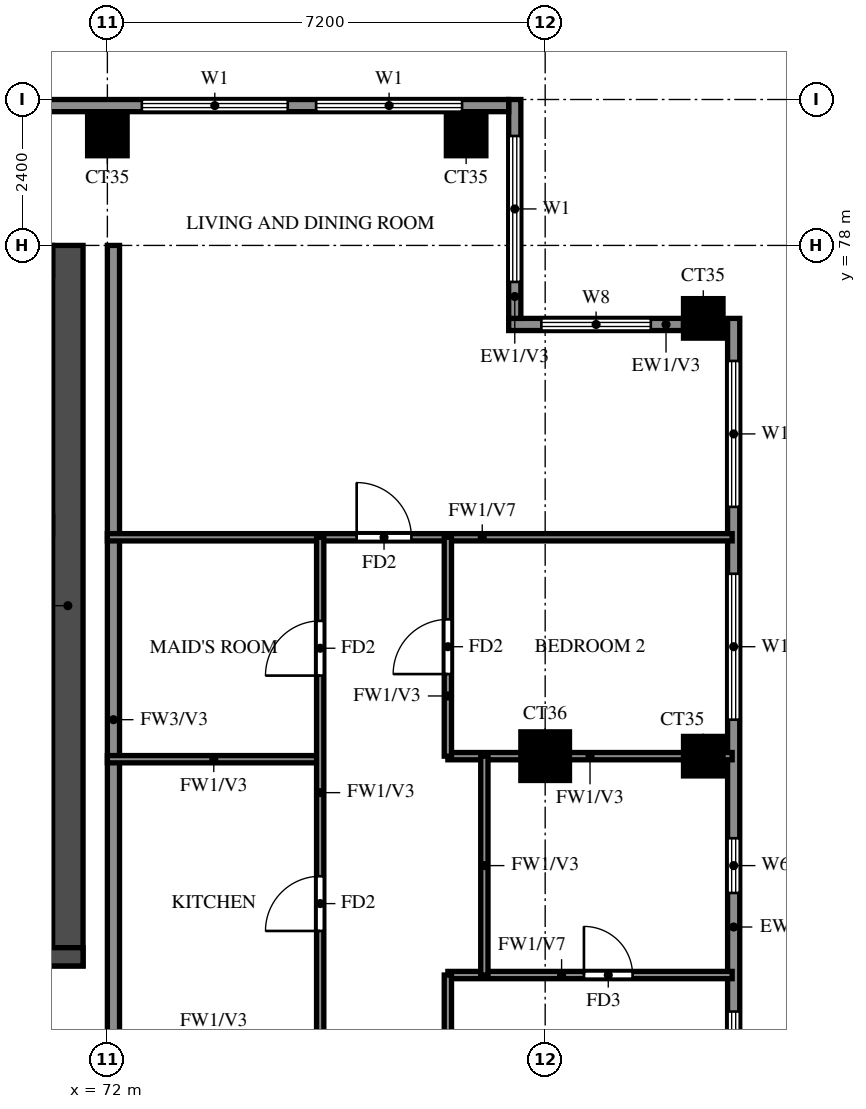
"""IFC4 building model, lengths in metres.
Left out: names, types, materials, properties, quantities, classifications, styles, units other than length and angle.
Written with IfcOpenShell. Run it as: python <this file> out.ifc"""

import sys

from ifc_helpers import new_model, si_unit, direction, frame, frame_2d, origin, origin_2d, place, context, subcontext, project, spatial, rectangle, extrude, source, transform, mapped, element, fill, save


model = new_model("IFC4")
c1 = context("Model", 3, precision=1e-05, world=origin(), true_north=direction((0.0, 1.0)))
c2 = subcontext(c1, "Body", "Model", "MODEL_VIEW")
j1 = project(units=[si_unit("LENGTHUNIT", "METRE"), si_unit("PLANEANGLEUNIT", "RADIAN")], contexts=[c1])
p1 = place(None, origin())
s1 = spatial("IfcSite", under=j1, at=p1, CompositionType="ELEMENT")
p2 = place(p1, origin())
s2 = spatial("IfcBuilding", under=s1, at=p2, CompositionType="ELEMENT")
p3 = place(p2, frame((0.0, 0.0, 232.5)))
s3 = spatial("IfcBuildingStorey", under=s2, at=p3, CompositionType="ELEMENT", Elevation=232.5)
m1 = source(origin(), c2, "Body", "SweptSolid", [
    extrude(rectangle(XDim=0.8, YDim=0.8, at=origin_2d()), origin(), (0.0, 0.0, 1.0), 3.22),
])
p4 = place(p3, frame((79.2, 69.6, 0.0), z_axis=(0.0, 0.0, 1.0), x_axis=(1.0, 0.0, 0.0)))
e1 = element("IfcColumn", 1, at=p4, inside=s3, PredefinedType="COLUMN", context=c2, shape_type="MappedRepresentation", body=[
    mapped(m1, transform((0.0, 0.0, 0.0))),
])
m2 = source(origin(), c2, "Body", "SweptSolid", [
    extrude(rectangle(XDim=0.65, YDim=0.65, at=origin_2d()), origin(), (0.0, 0.0, 1.0), 3.22),
])
for number, where, z_axis, x_axis in (
    (2, (81.8, 69.6, 0.0), (0.0, 0.0, 1.0), (1.0, 0.0, 0.0)),
    (3, (81.8, 76.8, 0.0), (0.0, 0.0, 1.0), (1.0, 0.0, 0.0)),
    (4, (72.0, 79.8, 0.0), (0.0, 0.0, 1.0), (1.0, 0.0, 0.0)),
    (5, (77.9, 79.8, 0.0), (0.0, 0.0, 1.0), (1.0, 0.0, 0.0)),
):
    element("IfcColumn", number, at=place(p3, frame(where, z_axis=z_axis, x_axis=x_axis)), inside=s3, PredefinedType="COLUMN", context=c2, shape_type="MappedRepresentation", body=[
        mapped(m2, transform((0.0, 0.0, 0.0))),
    ])
p5 = place(p3, frame((71.35, 66.15, 0.0), z_axis=(0.0, 0.0, 1.0), x_axis=(0.0, 1.0, 0.0)))
e6 = element("IfcWall", 6, at=p5, inside=s3, PredefinedType="SHEAR", context=c2, shape_type="SweptSolid", body=[
    extrude(rectangle(XDim=11.85, YDim=0.5, at=frame_2d((5.925, 0.0))), origin(), (0.0, 0.0, 1.0), 3.22),
])
p6 = place(p3, frame((29.7, 77.75, 0.0), z_axis=(0.0, 0.0, 1.0), x_axis=(1.0, 0.0, 0.0)))
e7 = element("IfcWall", 7, at=p6, inside=s3, PredefinedType="SHEAR", context=c2, shape_type="SweptSolid", body=[
    extrude(rectangle(XDim=41.4, YDim=0.5, at=frame_2d((20.7, 0.0))), origin(), (0.0, 0.0, 1.0), 3.22),
])
p7 = place(p3, frame((29.2, 66.3, 0.0), z_axis=(0.0, 0.0, 1.0), x_axis=(1.0, 0.0, 0.0)))
e8 = element("IfcWall", 8, at=p7, inside=s3, PredefinedType="SHEAR", context=c2, shape_type="SweptSolid", body=[
    extrude(rectangle(XDim=42.4, YDim=0.3, at=frame_2d((21.2, 0.0))), origin(), (0.0, 0.0, 1.0), 3.22),
])
p8 = place(p7, frame((1.425, 0.0, 0.0)))
e9 = element("IfcOpeningElement", 9, at=p8, cuts=e8, PredefinedType="OPENING", context=c2, shape_type="SweptSolid", body=[
    extrude(rectangle(XDim=1.1, YDim=2.1, at=frame_2d((0.55, 1.05))), frame((0.0, 0.16, 0.0), z_axis=(0.0, -1.0, 0.0), x_axis=(1.0, 0.0, 0.0)), (0.0, 0.0, 1.0), 0.32),
])
p9 = place(p7, frame((4.2, 0.0, 0.0)))
e10 = element("IfcOpeningElement", 10, at=p9, cuts=e8, PredefinedType="OPENING", context=c2, shape_type="SweptSolid", body=[
    extrude(rectangle(XDim=1.8, YDim=2.1, at=frame_2d((0.9, 1.05))), frame((0.0, 0.16, 0.0), z_axis=(0.0, -1.0, 0.0), x_axis=(1.0, 0.0, 0.0)), (0.0, 0.0, 1.0), 0.32),
])
p10 = place(p3, frame((82.3, 48.2, 0.0), z_axis=(0.0, 0.0, 1.0), x_axis=(0.0, 1.0, 0.0)))
e11 = element("IfcWall", 11, at=p10, inside=s3, PredefinedType="SOLIDWALL", context=c2, shape_type="SweptSolid", body=[
    extrude(rectangle(XDim=28.6, YDim=0.2, at=frame_2d((14.3, 0.0))), origin(), (0.0, 0.0, 1.0), 3.22),
])
p11 = place(p10, frame((4.3, 0.0, 0.0)))
e12 = element("IfcOpeningElement", 12, at=p11, cuts=e11, PredefinedType="OPENING", context=c2, shape_type="SweptSolid", body=[
    extrude(rectangle(XDim=1.8, YDim=2.4, at=frame_2d((0.9, 1.2))), frame((0.0, 0.11, 0.0), z_axis=(0.0, -1.0, 0.0), x_axis=(1.0, 0.0, 0.0)), (0.0, 0.0, 1.0), 0.22),
])
p12 = place(p10, frame((0.6, 0.0, 0.6)))
e13 = element("IfcOpeningElement", 13, at=p12, cuts=e11, PredefinedType="OPENING", context=c2, shape_type="SweptSolid", body=[
    extrude(rectangle(XDim=1.2, YDim=2.4, at=frame_2d((0.6, 1.2))), frame((0.0, 0.11, 0.0), z_axis=(0.0, -1.0, 0.0), x_axis=(1.0, 0.0, 0.0)), (0.0, 0.0, 1.0), 0.22),
])
p13 = place(p10, frame((2.95, 0.0, 0.6)))
e14 = element("IfcOpeningElement", 14, at=p13, cuts=e11, PredefinedType="OPENING", context=c2, shape_type="SweptSolid", body=[
    extrude(rectangle(XDim=0.9, YDim=2.4, at=frame_2d((0.45, 1.2))), frame((0.0, 0.11, 0.0), z_axis=(0.0, -1.0, 0.0), x_axis=(1.0, 0.0, 0.0)), (0.0, 0.0, 1.0), 0.22),
])
p14 = place(p10, frame((11.2, 0.0, 0.6)))
e15 = element("IfcOpeningElement", 15, at=p14, cuts=e11, PredefinedType="OPENING", context=c2, shape_type="SweptSolid", body=[
    extrude(rectangle(XDim=2.4, YDim=2.4, at=frame_2d((1.2, 1.2))), frame((0.0, 0.11, 0.0), z_axis=(0.0, -1.0, 0.0), x_axis=(1.0, 0.0, 0.0)), (0.0, 0.0, 1.0), 0.22),
])
p15 = place(p10, frame((7.45, 0.0, 1.5)))
e16 = element("IfcOpeningElement", 16, at=p15, cuts=e11, PredefinedType="OPENING", context=c2, shape_type="SweptSolid", body=[
    extrude(rectangle(XDim=0.9, YDim=0.9, at=frame_2d((0.45, 0.45))), frame((0.0, 0.11, 0.0), z_axis=(0.0, -1.0, 0.0), x_axis=(1.0, 0.0, 0.0)), (0.0, 0.0, 1.0), 0.22),
])
p16 = place(p10, frame((9.55, 0.0, 1.5)))
e17 = element("IfcOpeningElement", 17, at=p16, cuts=e11, PredefinedType="OPENING", context=c2, shape_type="SweptSolid", body=[
    extrude(rectangle(XDim=0.9, YDim=0.9, at=frame_2d((0.45, 0.45))), frame((0.0, 0.11, 0.0), z_axis=(0.0, -1.0, 0.0), x_axis=(1.0, 0.0, 0.0)), (0.0, 0.0, 1.0), 0.22),
])
p17 = place(p10, frame((14.8, 0.0, 0.6)))
e18 = element("IfcOpeningElement", 18, at=p17, cuts=e11, PredefinedType="OPENING", context=c2, shape_type="SweptSolid", body=[
    extrude(rectangle(XDim=2.4, YDim=2.4, at=frame_2d((1.2, 1.2))), frame((0.0, 0.11, 0.0), z_axis=(0.0, -1.0, 0.0), x_axis=(1.0, 0.0, 0.0)), (0.0, 0.0, 1.0), 0.22),
])
p18 = place(p10, frame((19.15, 0.0, 1.5)))
e19 = element("IfcOpeningElement", 19, at=p18, cuts=e11, PredefinedType="OPENING", context=c2, shape_type="SweptSolid", body=[
    extrude(rectangle(XDim=0.9, YDim=0.9, at=frame_2d((0.45, 0.45))), frame((0.0, 0.11, 0.0), z_axis=(0.0, -1.0, 0.0), x_axis=(1.0, 0.0, 0.0)), (0.0, 0.0, 1.0), 0.22),
])
p19 = place(p10, frame((22.0, 0.0, 0.6)))
e20 = element("IfcOpeningElement", 20, at=p19, cuts=e11, PredefinedType="OPENING", context=c2, shape_type="SweptSolid", body=[
    extrude(rectangle(XDim=2.4, YDim=2.4, at=frame_2d((1.2, 1.2))), frame((0.0, 0.11, 0.0), z_axis=(0.0, -1.0, 0.0), x_axis=(1.0, 0.0, 0.0)), (0.0, 0.0, 1.0), 0.22),
])
p20 = place(p10, frame((25.5, 0.0, 0.6)))
e21 = element("IfcOpeningElement", 21, at=p20, cuts=e11, PredefinedType="OPENING", context=c2, shape_type="SweptSolid", body=[
    extrude(rectangle(XDim=2.4, YDim=2.4, at=frame_2d((1.2, 1.2))), frame((0.0, 0.11, 0.0), z_axis=(0.0, -1.0, 0.0), x_axis=(1.0, 0.0, 0.0)), (0.0, 0.0, 1.0), 0.22),
])
p21 = place(p3, frame((81.475, 76.7, 0.0), z_axis=(0.0, 0.0, 1.0), x_axis=(-1.0, 0.0, 0.0)))
e22 = element("IfcWall", 22, at=p21, inside=s3, PredefinedType="SOLIDWALL", context=c2, shape_type="SweptSolid", body=[
    extrude(rectangle(XDim=2.875, YDim=0.2, at=frame_2d((1.438, 0.0))), origin(), (0.0, 0.0, 1.0), 3.22),
])
p22 = place(p21, frame((0.538, 0.0, 0.6)))
e23 = element("IfcOpeningElement", 23, at=p22, cuts=e22, PredefinedType="OPENING", context=c2, shape_type="SweptSolid", body=[
    extrude(rectangle(XDim=1.8, YDim=2.4, at=frame_2d((0.9, 1.2))), frame((0.0, 0.11, 0.0), z_axis=(0.0, -1.0, 0.0), x_axis=(1.0, 0.0, 0.0)), (0.0, 0.0, 1.0), 0.22),
])
p23 = place(p3, frame((78.7, 76.8, 0.0), z_axis=(0.0, 0.0, 1.0), x_axis=(0.0, 1.0, 0.0)))
e24 = element("IfcWall", 24, at=p23, inside=s3, PredefinedType="SOLIDWALL", context=c2, shape_type="SweptSolid", body=[
    extrude(rectangle(XDim=3.6, YDim=0.2, at=frame_2d((1.8, 0.0))), origin(), (0.0, 0.0, 1.0), 3.22),
])
p24 = place(p23, frame((0.6, 0.0, 0.6)))
e25 = element("IfcOpeningElement", 25, at=p24, cuts=e24, PredefinedType="OPENING", context=c2, shape_type="SweptSolid", body=[
    extrude(rectangle(XDim=2.4, YDim=2.4, at=frame_2d((1.2, 1.2))), frame((0.0, 0.11, 0.0), z_axis=(0.0, -1.0, 0.0), x_axis=(1.0, 0.0, 0.0)), (0.0, 0.0, 1.0), 0.22),
])
p25 = place(p3, frame((78.6, 80.3, 0.0), z_axis=(0.0, 0.0, 1.0), x_axis=(-1.0, 0.0, 0.0)))
e26 = element("IfcWall", 26, at=p25, inside=s3, PredefinedType="SOLIDWALL", context=c2, shape_type="SweptSolid", body=[
    extrude(rectangle(XDim=56.6, YDim=0.2, at=frame_2d((28.3, 0.0))), origin(), (0.0, 0.0, 1.0), 3.22),
])
p26 = place(p25, frame((50.433, 0.0, 0.6)))
e27 = element("IfcOpeningElement", 27, at=p26, cuts=e26, PredefinedType="OPENING", context=c2, shape_type="SweptSolid", body=[
    extrude(rectangle(XDim=2.4, YDim=2.4, at=frame_2d((1.2, 1.2))), frame((0.0, 0.11, 0.0), z_axis=(0.0, -1.0, 0.0), x_axis=(1.0, 0.0, 0.0)), (0.0, 0.0, 1.0), 0.22),
])
p27 = place(p25, frame((53.367, 0.0, 0.6)))
e28 = element("IfcOpeningElement", 28, at=p27, cuts=e26, PredefinedType="OPENING", context=c2, shape_type="SweptSolid", body=[
    extrude(rectangle(XDim=2.4, YDim=2.4, at=frame_2d((1.2, 1.2))), frame((0.0, 0.11, 0.0), z_axis=(0.0, -1.0, 0.0), x_axis=(1.0, 0.0, 0.0)), (0.0, 0.0, 1.0), 0.22),
])
p28 = place(p25, frame((0.767, 0.0, 0.6)))
e29 = element("IfcOpeningElement", 29, at=p28, cuts=e26, PredefinedType="OPENING", context=c2, shape_type="SweptSolid", body=[
    extrude(rectangle(XDim=2.4, YDim=2.4, at=frame_2d((1.2, 1.2))), frame((0.0, 0.11, 0.0), z_axis=(0.0, -1.0, 0.0), x_axis=(1.0, 0.0, 0.0)), (0.0, 0.0, 1.0), 0.22),
])
p29 = place(p25, frame((3.633, 0.0, 0.6)))
e30 = element("IfcOpeningElement", 30, at=p29, cuts=e26, PredefinedType="OPENING", context=c2, shape_type="SweptSolid", body=[
    extrude(rectangle(XDim=2.4, YDim=2.4, at=frame_2d((1.2, 1.2))), frame((0.0, 0.11, 0.0), z_axis=(0.0, -1.0, 0.0), x_axis=(1.0, 0.0, 0.0)), (0.0, 0.0, 1.0), 0.22),
])
p30 = place(p3, frame((72.1, 62.4, 0.0), z_axis=(0.0, 0.0, 1.0), x_axis=(0.0, 1.0, 0.0)))
e31 = element("IfcWall", 31, at=p30, inside=s3, PredefinedType="SOLIDWALL", context=c2, shape_type="SweptSolid", body=[
    extrude(rectangle(XDim=15.6, YDim=0.2, at=frame_2d((7.8, 0.0))), origin(), (0.0, 0.0, 1.0), 3.22),
])
p31 = place(p3, frame((77.6, 66.0, 0.0), z_axis=(0.0, 0.0, 1.0), x_axis=(1.0, 0.0, 0.0)))
e32 = element("IfcWall", 32, at=p31, inside=s3, PredefinedType="PARTITIONING", context=c2, shape_type="SweptSolid", body=[
    extrude(rectangle(XDim=4.675, YDim=0.12, at=frame_2d((2.337, 0.0))), origin(), (0.0, 0.0, 1.0), 2.32),
])
p32 = place(p31, frame((2.238, 0.0, 0.0)))
e33 = element("IfcOpeningElement", 33, at=p32, cuts=e32, PredefinedType="OPENING", context=c2, shape_type="SweptSolid", body=[
    extrude(rectangle(XDim=0.8, YDim=2.1, at=frame_2d((0.4, 1.05))), frame((0.0, 0.07, 0.0), z_axis=(0.0, -1.0, 0.0), x_axis=(1.0, 0.0, 0.0)), (0.0, 0.0, 1.0), 0.14),
])
p33 = place(p3, frame((72.0, 69.55, 0.0), z_axis=(0.0, 0.0, 1.0), x_axis=(1.0, 0.0, 0.0)))
e34 = element("IfcWall", 34, at=p33, inside=s3, PredefinedType="PARTITIONING", context=c2, shape_type="SweptSolid", body=[
    extrude(rectangle(XDim=3.5, YDim=0.12, at=frame_2d((1.75, 0.0))), origin(), (0.0, 0.0, 1.0), 3.22),
])
p34 = place(p3, frame((77.6, 69.6, 0.0), z_axis=(0.0, 0.0, 1.0), x_axis=(1.0, 0.0, 0.0)))
e35 = element("IfcWall", 35, at=p34, inside=s3, PredefinedType="PARTITIONING", context=c2, shape_type="SweptSolid", body=[
    extrude(rectangle(XDim=4.675, YDim=0.12, at=frame_2d((2.337, 0.0))), origin(), (0.0, 0.0, 1.0), 3.22),
])
p35 = place(p3, frame((72.0, 73.2, 0.0), z_axis=(0.0, 0.0, 1.0), x_axis=(1.0, 0.0, 0.0)))
e36 = element("IfcWall", 36, at=p35, inside=s3, PredefinedType="PARTITIONING", context=c2, shape_type="SweptSolid", body=[
    extrude(rectangle(XDim=10.275, YDim=0.12, at=frame_2d((5.137, 0.0))), origin(), (0.0, 0.0, 1.0), 2.32),
])
p36 = place(p35, frame((4.1, 0.0, 0.0)))
e37 = element("IfcOpeningElement", 37, at=p36, cuts=e36, PredefinedType="OPENING", context=c2, shape_type="SweptSolid", body=[
    extrude(rectangle(XDim=0.9, YDim=2.1, at=frame_2d((0.45, 1.05))), frame((0.0, 0.07, 0.0), z_axis=(0.0, -1.0, 0.0), x_axis=(1.0, 0.0, 0.0)), (0.0, 0.0, 1.0), 0.14),
])
p37 = place(p3, frame((75.5, 64.8, 0.0), z_axis=(0.0, 0.0, 1.0), x_axis=(0.0, 1.0, 0.0)))
e38 = element("IfcWall", 38, at=p37, inside=s3, PredefinedType="PARTITIONING", context=c2, shape_type="SweptSolid", body=[
    extrude(rectangle(XDim=8.4, YDim=0.12, at=frame_2d((4.2, 0.0))), origin(), (0.0, 0.0, 1.0), 3.22),
])
p38 = place(p37, frame((1.925, 0.0, 0.0)))
e39 = element("IfcOpeningElement", 39, at=p38, cuts=e38, PredefinedType="OPENING", context=c2, shape_type="SweptSolid", body=[
    extrude(rectangle(XDim=0.9, YDim=2.1, at=frame_2d((0.45, 1.05))), frame((0.0, 0.07, 0.0), z_axis=(0.0, -1.0, 0.0), x_axis=(1.0, 0.0, 0.0)), (0.0, 0.0, 1.0), 0.14),
])
p39 = place(p37, frame((6.125, 0.0, 0.0)))
e40 = element("IfcOpeningElement", 40, at=p39, cuts=e38, PredefinedType="OPENING", context=c2, shape_type="SweptSolid", body=[
    extrude(rectangle(XDim=0.9, YDim=2.1, at=frame_2d((0.45, 1.05))), frame((0.0, 0.07, 0.0), z_axis=(0.0, -1.0, 0.0), x_axis=(1.0, 0.0, 0.0)), (0.0, 0.0, 1.0), 0.14),
])
p40 = place(p3, frame((77.6, 58.8, 0.0), z_axis=(0.0, 0.0, 1.0), x_axis=(0.0, 1.0, 0.0)))
e41 = element("IfcWall", 41, at=p40, inside=s3, PredefinedType="PARTITIONING", context=c2, shape_type="SweptSolid", body=[
    extrude(rectangle(XDim=7.2, YDim=0.12, at=frame_2d((3.6, 0.0))), origin(), (0.0, 0.0, 1.0), 3.22),
])
p41 = place(p40, frame((1.35, 0.0, 0.0)))
e42 = element("IfcOpeningElement", 42, at=p41, cuts=e41, PredefinedType="OPENING", context=c2, shape_type="SweptSolid", body=[
    extrude(rectangle(XDim=0.9, YDim=2.1, at=frame_2d((0.45, 1.05))), frame((0.0, 0.07, 0.0), z_axis=(0.0, -1.0, 0.0), x_axis=(1.0, 0.0, 0.0)), (0.0, 0.0, 1.0), 0.14),
])
p42 = place(p40, frame((4.95, 0.0, 0.0)))
e43 = element("IfcOpeningElement", 43, at=p42, cuts=e41, PredefinedType="OPENING", context=c2, shape_type="SweptSolid", body=[
    extrude(rectangle(XDim=0.9, YDim=2.1, at=frame_2d((0.45, 1.05))), frame((0.0, 0.07, 0.0), z_axis=(0.0, -1.0, 0.0), x_axis=(1.0, 0.0, 0.0)), (0.0, 0.0, 1.0), 0.14),
])
p43 = place(p3, frame((77.6, 69.6, 0.0), z_axis=(0.0, 0.0, 1.0), x_axis=(0.0, 1.0, 0.0)))
e44 = element("IfcWall", 44, at=p43, inside=s3, PredefinedType="PARTITIONING", context=c2, shape_type="SweptSolid", body=[
    extrude(rectangle(XDim=3.6, YDim=0.12, at=frame_2d((1.8, 0.0))), origin(), (0.0, 0.0, 1.0), 3.22),
])
p44 = place(p43, frame((1.35, 0.0, 0.0)))
e45 = element("IfcOpeningElement", 45, at=p44, cuts=e44, PredefinedType="OPENING", context=c2, shape_type="SweptSolid", body=[
    extrude(rectangle(XDim=0.9, YDim=2.1, at=frame_2d((0.45, 1.05))), frame((0.0, 0.07, 0.0), z_axis=(0.0, -1.0, 0.0), x_axis=(1.0, 0.0, 0.0)), (0.0, 0.0, 1.0), 0.14),
])
p45 = place(p3, frame((78.2, 66.0, 0.0), z_axis=(0.0, 0.0, 1.0), x_axis=(0.0, 1.0, 0.0)))
e46 = element("IfcWall", 46, at=p45, inside=s3, PredefinedType="PARTITIONING", context=c2, shape_type="SweptSolid", body=[
    extrude(rectangle(XDim=3.6, YDim=0.12, at=frame_2d((1.8, 0.0))), origin(), (0.0, 0.0, 1.0), 3.22),
])
p46 = place(p17, origin())
e47 = element("IfcWindow", 47, at=p46, inside=s3, PartitioningType="DOUBLE_PANEL_VERTICAL", PredefinedType="WINDOW", context=c2, shape_type="SweptSolid", body=[
    extrude(rectangle(XDim=2.4, YDim=2.4, at=frame_2d((1.2, 1.2))), frame((0.0, 0.03, 0.0), z_axis=(0.0, -1.0, 0.0), x_axis=(1.0, 0.0, 0.0)), (0.0, 0.0, 1.0), 0.06),
])
fill(e18, e47)
p47 = place(p18, origin())
e48 = element("IfcWindow", 48, at=p47, inside=s3, PartitioningType="SINGLE_PANEL", PredefinedType="WINDOW", context=c2, shape_type="SweptSolid", body=[
    extrude(rectangle(XDim=0.9, YDim=0.9, at=frame_2d((0.45, 0.45))), frame((0.0, 0.03, 0.0), z_axis=(0.0, -1.0, 0.0), x_axis=(1.0, 0.0, 0.0)), (0.0, 0.0, 1.0), 0.06),
])
fill(e19, e48)
p48 = place(p19, origin())
e49 = element("IfcWindow", 49, at=p48, inside=s3, PartitioningType="DOUBLE_PANEL_VERTICAL", PredefinedType="WINDOW", context=c2, shape_type="SweptSolid", body=[
    extrude(rectangle(XDim=2.4, YDim=2.4, at=frame_2d((1.2, 1.2))), frame((0.0, 0.03, 0.0), z_axis=(0.0, -1.0, 0.0), x_axis=(1.0, 0.0, 0.0)), (0.0, 0.0, 1.0), 0.06),
])
fill(e20, e49)
p49 = place(p20, origin())
e50 = element("IfcWindow", 50, at=p49, inside=s3, PartitioningType="DOUBLE_PANEL_VERTICAL", PredefinedType="WINDOW", context=c2, shape_type="SweptSolid", body=[
    extrude(rectangle(XDim=2.4, YDim=2.4, at=frame_2d((1.2, 1.2))), frame((0.0, 0.03, 0.0), z_axis=(0.0, -1.0, 0.0), x_axis=(1.0, 0.0, 0.0)), (0.0, 0.0, 1.0), 0.06),
])
fill(e21, e50)
p50 = place(p22, origin())
e51 = element("IfcWindow", 51, at=p50, inside=s3, PartitioningType="DOUBLE_PANEL_VERTICAL", PredefinedType="WINDOW", context=c2, shape_type="SweptSolid", body=[
    extrude(rectangle(XDim=1.8, YDim=2.4, at=frame_2d((0.9, 1.2))), frame((0.0, 0.03, 0.0), z_axis=(0.0, -1.0, 0.0), x_axis=(1.0, 0.0, 0.0)), (0.0, 0.0, 1.0), 0.06),
])
fill(e23, e51)
p51 = place(p24, origin())
e52 = element("IfcWindow", 52, at=p51, inside=s3, PartitioningType="DOUBLE_PANEL_VERTICAL", PredefinedType="WINDOW", context=c2, shape_type="SweptSolid", body=[
    extrude(rectangle(XDim=2.4, YDim=2.4, at=frame_2d((1.2, 1.2))), frame((0.0, 0.03, 0.0), z_axis=(0.0, -1.0, 0.0), x_axis=(1.0, 0.0, 0.0)), (0.0, 0.0, 1.0), 0.06),
])
fill(e25, e52)
p52 = place(p28, origin())
e53 = element("IfcWindow", 53, at=p52, inside=s3, PartitioningType="DOUBLE_PANEL_VERTICAL", PredefinedType="WINDOW", context=c2, shape_type="SweptSolid", body=[
    extrude(rectangle(XDim=2.4, YDim=2.4, at=frame_2d((1.2, 1.2))), frame((0.0, 0.03, 0.0), z_axis=(0.0, -1.0, 0.0), x_axis=(1.0, 0.0, 0.0)), (0.0, 0.0, 1.0), 0.06),
])
fill(e29, e53)
p53 = place(p29, origin())
e54 = element("IfcWindow", 54, at=p53, inside=s3, PartitioningType="DOUBLE_PANEL_VERTICAL", PredefinedType="WINDOW", context=c2, shape_type="SweptSolid", body=[
    extrude(rectangle(XDim=2.4, YDim=2.4, at=frame_2d((1.2, 1.2))), frame((0.0, 0.03, 0.0), z_axis=(0.0, -1.0, 0.0), x_axis=(1.0, 0.0, 0.0)), (0.0, 0.0, 1.0), 0.06),
])
fill(e30, e54)
p54 = place(p32, origin())
e55 = element("IfcDoor", 55, at=p54, inside=s3, OperationType="SINGLE_SWING_LEFT", PredefinedType="DOOR", context=c2, shape_type="SweptSolid", body=[
    extrude(rectangle(XDim=0.8, YDim=2.1, at=frame_2d((0.4, 1.05))), frame((0.0, 0.025, 0.0), z_axis=(0.0, -1.0, 0.0), x_axis=(1.0, 0.0, 0.0)), (0.0, 0.0, 1.0), 0.05),
])
fill(e33, e55)
p55 = place(p44, origin())
e56 = element("IfcDoor", 56, at=p55, inside=s3, OperationType="SINGLE_SWING_LEFT", PredefinedType="DOOR", context=c2, shape_type="SweptSolid", body=[
    extrude(rectangle(XDim=0.9, YDim=2.1, at=frame_2d((0.45, 1.05))), frame((0.0, 0.025, 0.0), z_axis=(0.0, -1.0, 0.0), x_axis=(1.0, 0.0, 0.0)), (0.0, 0.0, 1.0), 0.05),
])
fill(e45, e56)
p56 = place(p36, origin())
e57 = element("IfcDoor", 57, at=p56, inside=s3, OperationType="SINGLE_SWING_RIGHT", PredefinedType="DOOR", context=c2, shape_type="SweptSolid", body=[
    extrude(rectangle(XDim=0.9, YDim=2.1, at=frame_2d((0.45, 1.05))), frame((0.0, 0.025, 0.0), z_axis=(0.0, -1.0, 0.0), x_axis=(1.0, 0.0, 0.0)), (0.0, 0.0, 1.0), 0.05),
])
fill(e37, e57)
p57 = place(p38, origin())
e58 = element("IfcDoor", 58, at=p57, inside=s3, OperationType="SINGLE_SWING_LEFT", PredefinedType="DOOR", context=c2, shape_type="SweptSolid", body=[
    extrude(rectangle(XDim=0.9, YDim=2.1, at=frame_2d((0.45, 1.05))), frame((0.0, 0.025, 0.0), z_axis=(0.0, -1.0, 0.0), x_axis=(1.0, 0.0, 0.0)), (0.0, 0.0, 1.0), 0.05),
])
fill(e39, e58)
p58 = place(p39, origin())
e59 = element("IfcDoor", 59, at=p58, inside=s3, OperationType="SINGLE_SWING_LEFT", PredefinedType="DOOR", context=c2, shape_type="SweptSolid", body=[
    extrude(rectangle(XDim=0.9, YDim=2.1, at=frame_2d((0.45, 1.05))), frame((0.0, 0.025, 0.0), z_axis=(0.0, -1.0, 0.0), x_axis=(1.0, 0.0, 0.0)), (0.0, 0.0, 1.0), 0.05),
])
fill(e40, e59)
save(model, sys.argv[1])
